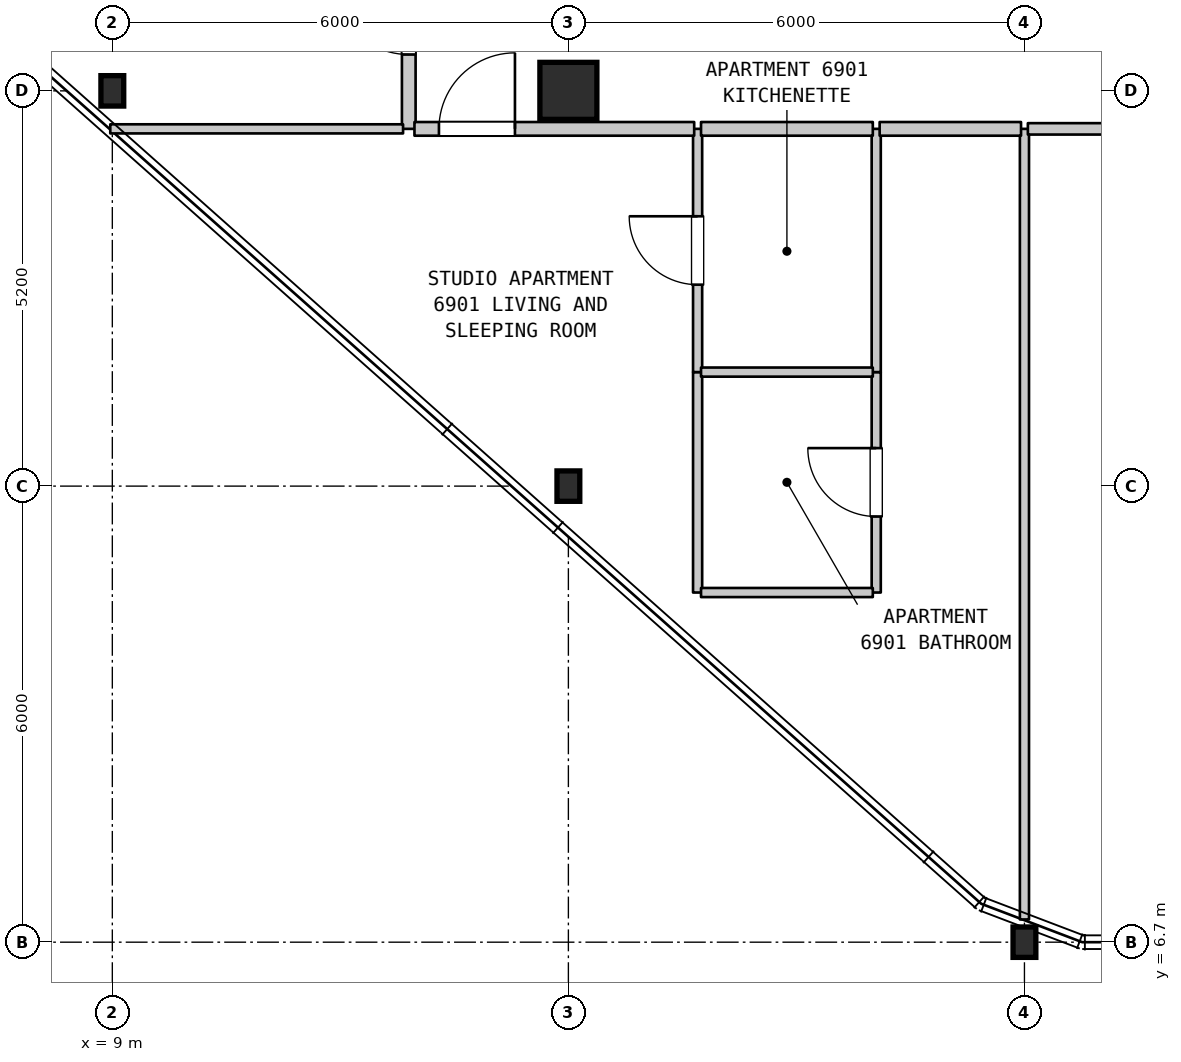
"""IFC4 building model, lengths in metres.
Left out: names, types, materials, properties, quantities, classifications, styles, units other than length and angle.
Written with IfcOpenShell. Run it as: python <this file> out.ifc"""

import sys

from ifc_helpers import new_model, si_unit, direction, frame, frame_2d, origin, origin_2d, place, context, subcontext, project, spatial, rectangle, i_section, extrude, element, fill, save


model = new_model("IFC4")
c1 = context("Model", 3, precision=1e-05, world=origin(), true_north=direction((0.0, 1.0)))
c2 = subcontext(c1, "Body", "Model", "MODEL_VIEW")
j1 = project(units=[si_unit("LENGTHUNIT", "METRE"), si_unit("PLANEANGLEUNIT", "RADIAN")], contexts=[c1])
p1 = place(None, origin())
s1 = spatial("IfcSite", under=j1, at=p1, CompositionType="ELEMENT")
p2 = place(p1, origin())
s2 = spatial("IfcBuilding", under=s1, at=p2, CompositionType="ELEMENT")
p3 = place(p2, frame((0.0, 0.0, 276.9)))
s3 = spatial("IfcBuildingStorey", under=s2, at=p3, CompositionType="ELEMENT", Elevation=276.9)
for number, where, z_axis, x_axis in (
    (1, (9.0, 17.9, 0.0), (0.0, 0.0, 1.0), (1.0, 0.0, 0.0)),
    (2, (15.0, 12.7, 0.0), (0.0, 0.0, 1.0), (1.0, 0.0, 0.0)),
):
    element("IfcColumn", number, at=place(p3, frame(where, z_axis=z_axis, x_axis=x_axis)), inside=s3, PredefinedType="COLUMN", context=c2, shape_type="SweptSolid", body=[
        extrude(i_section(OverallWidth=0.3, OverallDepth=0.4, WebThickness=0.013, FlangeThickness=0.024, FilletRadius=0.027, at=origin_2d()), origin(), (0.0, 0.0, 1.0), 3.7),
    ])
p4 = place(p3, frame((15.0, 17.9, 0.0), z_axis=(0.0, 0.0, 1.0), x_axis=(1.0, 0.0, 0.0)))
e3 = element("IfcColumn", 3, at=p4, inside=s3, PredefinedType="COLUMN", context=c2, shape_type="SweptSolid", body=[
    extrude(rectangle(XDim=0.75, YDim=0.75, at=origin_2d()), origin(), (0.0, 0.0, 1.0), 3.7),
])
p5 = place(p3, frame((21.0, 6.7, 0.0), z_axis=(0.0, 0.0, 1.0), x_axis=(1.0, 0.0, 0.0)))
e4 = element("IfcColumn", 4, at=p5, inside=s3, PredefinedType="COLUMN", context=c2, shape_type="SweptSolid", body=[
    extrude(i_section(OverallWidth=0.3, OverallDepth=0.4, WebThickness=0.013, FlangeThickness=0.024, FilletRadius=0.027, at=origin_2d()), origin(), (0.0, 0.0, 1.0), 3.7),
])
p6 = place(p3, frame((12.9, 17.4, 0.0), z_axis=(0.0, 0.0, 1.0), x_axis=(0.0, 1.0, 0.0)))
e5 = element("IfcWall", 5, at=p6, inside=s3, PredefinedType="STANDARD", context=c2, shape_type="SweptSolid", body=[
    extrude(rectangle(XDim=3.1, YDim=0.18, at=frame_2d((1.55, 0.0))), origin(), (0.0, 0.0, 1.0), 3.39),
])
p7 = place(p6, frame((0.978, 0.0, 0.0)))
e6 = element("IfcOpeningElement", 6, at=p7, cuts=e5, PredefinedType="OPENING", context=c2, shape_type="SweptSolid", body=[
    extrude(rectangle(XDim=1.0, YDim=2.15, at=frame_2d((0.5, 1.075))), frame((0.0, 0.1, 0.0), z_axis=(0.0, -1.0, 0.0), x_axis=(1.0, 0.0, 0.0)), (0.0, 0.0, 1.0), 0.2),
])
p8 = place(p3, frame((16.7, 11.3, 0.0), z_axis=(0.0, 0.0, 1.0), x_axis=(0.0, 1.0, 0.0)))
e7 = element("IfcWall", 7, at=p8, inside=s3, PredefinedType="PARTITIONING", context=c2, shape_type="SweptSolid", body=[
    extrude(rectangle(XDim=2.9, YDim=0.12, at=frame_2d((1.45, 0.0))), origin(), (0.0, 0.0, 1.0), 3.39),
])
p9 = place(p3, frame((16.7, 14.2, 0.0), z_axis=(0.0, 0.0, 1.0), x_axis=(0.0, 1.0, 0.0)))
e8 = element("IfcWall", 8, at=p9, inside=s3, PredefinedType="PARTITIONING", context=c2, shape_type="SweptSolid", body=[
    extrude(rectangle(XDim=3.2, YDim=0.12, at=frame_2d((1.6, 0.0))), origin(), (0.0, 0.0, 1.0), 3.39),
])
p10 = place(p9, frame((1.15, 0.0, 0.0)))
e9 = element("IfcOpeningElement", 9, at=p10, cuts=e8, PredefinedType="OPENING", context=c2, shape_type="SweptSolid", body=[
    extrude(rectangle(XDim=0.9, YDim=2.15, at=frame_2d((0.45, 1.075))), frame((0.0, 0.07, 0.0), z_axis=(0.0, -1.0, 0.0), x_axis=(1.0, 0.0, 0.0)), (0.0, 0.0, 1.0), 0.14),
])
p11 = place(p3, frame((19.05, 11.3, 0.0), z_axis=(0.0, 0.0, 1.0), x_axis=(0.0, 1.0, 0.0)))
e10 = element("IfcWall", 10, at=p11, inside=s3, PredefinedType="PARTITIONING", context=c2, shape_type="SweptSolid", body=[
    extrude(rectangle(XDim=2.9, YDim=0.12, at=frame_2d((1.45, 0.0))), origin(), (0.0, 0.0, 1.0), 3.39),
])
p12 = place(p11, frame((1.0, 0.0, 0.0)))
e11 = element("IfcOpeningElement", 11, at=p12, cuts=e10, PredefinedType="OPENING", context=c2, shape_type="SweptSolid", body=[
    extrude(rectangle(XDim=0.9, YDim=2.1, at=frame_2d((0.45, 1.05))), frame((0.0, 0.07, 0.0), z_axis=(0.0, -1.0, 0.0), x_axis=(1.0, 0.0, 0.0)), (0.0, 0.0, 1.0), 0.14),
])
p13 = place(p3, frame((19.05, 14.2, 0.0), z_axis=(0.0, 0.0, 1.0), x_axis=(0.0, 1.0, 0.0)))
e12 = element("IfcWall", 12, at=p13, inside=s3, PredefinedType="PARTITIONING", context=c2, shape_type="SweptSolid", body=[
    extrude(rectangle(XDim=3.2, YDim=0.12, at=frame_2d((1.6, 0.0))), origin(), (0.0, 0.0, 1.0), 3.39),
])
p14 = place(p3, frame((21.0, 6.999, 0.0), z_axis=(0.0, 0.0, 1.0), x_axis=(0.0, 1.0, 0.0)))
e13 = element("IfcWall", 13, at=p14, inside=s3, PredefinedType="PARTITIONING", context=c2, shape_type="SweptSolid", body=[
    extrude(rectangle(XDim=10.401, YDim=0.12, at=frame_2d((5.2, 0.0))), origin(), (0.0, 0.0, 1.0), 3.39),
])
for number, where, z_axis, x_axis in (
    (14, (16.745, 11.3, 0.0), (0.0, 0.0, 1.0), (1.0, 0.0, 0.0)),
    (15, (16.745, 14.2, 0.0), (0.0, 0.0, 1.0), (1.0, 0.0, 0.0)),
):
    element("IfcWall", number, at=place(p3, frame(where, z_axis=z_axis, x_axis=x_axis)), inside=s3, PredefinedType="PARTITIONING", context=c2, shape_type="SweptSolid", body=[
        extrude(rectangle(XDim=2.26, YDim=0.12, at=frame_2d((1.13, 0.0))), origin(), (0.0, 0.0, 1.0), 3.39),
    ])
p15 = place(p3, frame((8.973, 17.4, 0.0), z_axis=(0.0, 0.0, 1.0), x_axis=(1.0, 0.0, 0.0)))
e16 = element("IfcWall", 16, at=p15, inside=s3, PredefinedType="PARTITIONING", context=c2, shape_type="SweptSolid", body=[
    extrude(rectangle(XDim=3.852, YDim=0.12, at=frame_2d((1.926, 0.0))), origin(), (0.0, 0.0, 1.0), 3.39),
])
p16 = place(p3, frame((12.975, 17.4, 0.0), z_axis=(0.0, 0.0, 1.0), x_axis=(1.0, 0.0, 0.0)))
e17 = element("IfcWall", 17, at=p16, inside=s3, PredefinedType="STANDARD", context=c2, shape_type="SweptSolid", body=[
    extrude(rectangle(XDim=3.68, YDim=0.18, at=frame_2d((1.84, 0.0))), origin(), (0.0, 0.0, 1.0), 3.39),
])
p17 = place(p16, frame((0.322, 0.0, 0.0)))
e18 = element("IfcOpeningElement", 18, at=p17, cuts=e17, PredefinedType="OPENING", context=c2, shape_type="SweptSolid", body=[
    extrude(rectangle(XDim=1.0, YDim=2.15, at=frame_2d((0.5, 1.075))), frame((0.0, 0.1, 0.0), z_axis=(0.0, -1.0, 0.0), x_axis=(1.0, 0.0, 0.0)), (0.0, 0.0, 1.0), 0.2),
])
p18 = place(p3, frame((16.745, 17.4, 0.0), z_axis=(0.0, 0.0, 1.0), x_axis=(1.0, 0.0, 0.0)))
e19 = element("IfcWall", 19, at=p18, inside=s3, PredefinedType="STANDARD", context=c2, shape_type="SweptSolid", body=[
    extrude(rectangle(XDim=2.26, YDim=0.18, at=frame_2d((1.13, 0.0))), origin(), (0.0, 0.0, 1.0), 3.39),
])
p19 = place(p3, frame((19.095, 17.4, 0.0), z_axis=(0.0, 0.0, 1.0), x_axis=(1.0, 0.0, 0.0)))
e20 = element("IfcWall", 20, at=p19, inside=s3, PredefinedType="STANDARD", context=c2, shape_type="SweptSolid", body=[
    extrude(rectangle(XDim=1.86, YDim=0.18, at=frame_2d((0.93, 0.0))), origin(), (0.0, 0.0, 1.0), 3.39),
])
p20 = place(p3, frame((21.045, 17.4, 0.0), z_axis=(0.0, 0.0, 1.0), x_axis=(1.0, 0.0, 0.0)))
e21 = element("IfcWall", 21, at=p20, inside=s3, PredefinedType="STANDARD", context=c2, shape_type="SweptSolid", body=[
    extrude(rectangle(XDim=6.51, YDim=0.15, at=frame_2d((3.255, 0.0))), origin(), (0.0, 0.0, 1.0), 3.39),
])
p21 = place(p20, frame((2.755, 0.0, 0.0)))
e22 = element("IfcOpeningElement", 22, at=p21, cuts=e21, PredefinedType="OPENING", context=c2, shape_type="SweptSolid", body=[
    extrude(rectangle(XDim=1.0, YDim=2.15, at=frame_2d((0.5, 1.075))), frame((0.0, 0.085, 0.0), z_axis=(0.0, -1.0, 0.0), x_axis=(1.0, 0.0, 0.0)), (0.0, 0.0, 1.0), 0.17),
])
p22 = place(p7, origin())
e23 = element("IfcDoor", 23, at=p22, inside=s3, OperationType="SINGLE_SWING_RIGHT", PredefinedType="DOOR", context=c2, shape_type="SweptSolid", body=[
    extrude(rectangle(XDim=1.0, YDim=2.15, at=frame_2d((0.5, 1.075))), frame((0.0, 0.025, 0.0), z_axis=(0.0, -1.0, 0.0), x_axis=(1.0, 0.0, 0.0)), (0.0, 0.0, 1.0), 0.05),
])
fill(e6, e23)
p23 = place(p10, origin())
e24 = element("IfcDoor", 24, at=p23, inside=s3, OperationType="SINGLE_SWING_RIGHT", PredefinedType="DOOR", context=c2, shape_type="SweptSolid", body=[
    extrude(rectangle(XDim=0.9, YDim=2.15, at=frame_2d((0.45, 1.075))), frame((0.0, 0.025, 0.0), z_axis=(0.0, -1.0, 0.0), x_axis=(1.0, 0.0, 0.0)), (0.0, 0.0, 1.0), 0.05),
])
fill(e9, e24)
p24 = place(p12, origin())
e25 = element("IfcDoor", 25, at=p24, inside=s3, OperationType="SINGLE_SWING_RIGHT", PredefinedType="DOOR", context=c2, shape_type="SweptSolid", body=[
    extrude(rectangle(XDim=0.9, YDim=2.1, at=frame_2d((0.45, 1.05))), frame((0.0, 0.025, 0.0), z_axis=(0.0, -1.0, 0.0), x_axis=(1.0, 0.0, 0.0)), (0.0, 0.0, 1.0), 0.05),
])
fill(e11, e25)
p25 = place(p17, origin())
e26 = element("IfcDoor", 26, at=p25, inside=s3, OperationType="SINGLE_SWING_RIGHT", PredefinedType="DOOR", context=c2, shape_type="SweptSolid", body=[
    extrude(rectangle(XDim=1.0, YDim=2.15, at=frame_2d((0.5, 1.075))), frame((0.0, 0.025, 0.0), z_axis=(0.0, -1.0, 0.0), x_axis=(1.0, 0.0, 0.0)), (0.0, 0.0, 1.0), 0.05),
])
fill(e18, e26)
save(model, sys.argv[1])
